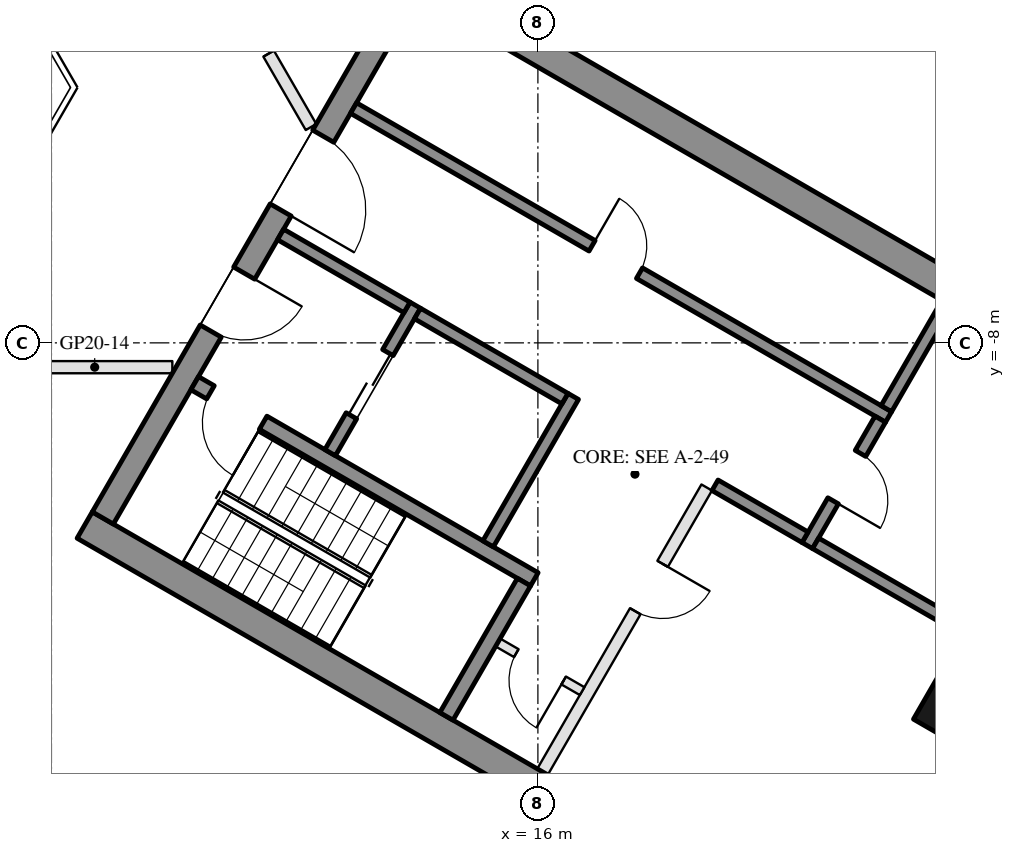
"""IFC4 building model, lengths in metres.
Left out: names, types, materials, properties, quantities, classifications, styles, units other than length and angle.
Written with IfcOpenShell. Run it as: python <this file> out.ifc"""

import sys

from ifc_helpers import new_model, si_unit, direction, frame, frame_2d, origin, origin_2d, place, context, subcontext, project, spatial, rectangle, hollow_rectangle, extrude, element, fill, save


model = new_model("IFC4")
c1 = context("Model", 3, precision=1e-05, world=origin(), true_north=direction((0.0, 1.0)))
c2 = subcontext(c1, "Body", "Model", "MODEL_VIEW")
j1 = project(units=[si_unit("LENGTHUNIT", "METRE"), si_unit("PLANEANGLEUNIT", "RADIAN")], contexts=[c1])
p1 = place(None, origin())
s1 = spatial("IfcSite", under=j1, at=p1, CompositionType="ELEMENT")
p2 = place(p1, origin())
s2 = spatial("IfcBuilding", under=s1, at=p2, CompositionType="ELEMENT")
p3 = place(p2, frame((0.0, 0.0, 213.2)))
s3 = spatial("IfcBuildingStorey", under=s2, at=p3, CompositionType="ELEMENT", Elevation=213.2)
p4 = place(p3, frame((23.729, -13.7, 0.0), z_axis=(0.0, 0.0, 1.0), x_axis=(0.5, 0.866025403784, 0.0)))
e1 = element("IfcColumn", 1, at=p4, inside=s3, PredefinedType="COLUMN", context=c2, shape_type="SweptSolid", body=[
    extrude(hollow_rectangle(XDim=2.4, YDim=2.2, WallThickness=0.06, at=origin_2d()), origin(), (0.0, 0.0, 1.0), 3.7),
])
p5 = place(p3, frame((26.257, -6.567, 0.0), z_axis=(0.0, 0.0, 1.0), x_axis=(-0.500023526245, 0.866011820475, 0.0)))
e2 = element("IfcWall", 2, at=p5, inside=s3, PredefinedType="SOLIDWALL", context=c2, shape_type="SweptSolid", body=[
    extrude(rectangle(XDim=11.816, YDim=0.35, at=frame_2d((5.908, 0.0))), origin(), (0.0, 0.0, 1.0), 3.55),
])
p6 = place(p5, frame((0.38, 0.0, 0.3)))
e3 = element("IfcOpeningElement", 3, at=p6, cuts=e2, PredefinedType="OPENING", context=c2, shape_type="SweptSolid", body=[
    extrude(rectangle(XDim=1.9, YDim=2.65, at=frame_2d((0.95, 1.325))), frame((0.0, 0.185, 0.0), z_axis=(0.0, -1.0, 0.0), x_axis=(1.0, 0.0, 0.0)), (0.0, 0.0, 1.0), 0.37),
])
p7 = place(p5, frame((7.791, 0.0, 0.0)))
e4 = element("IfcOpeningElement", 4, at=p7, cuts=e2, PredefinedType="OPENING", context=c2, shape_type="SweptSolid", body=[
    extrude(rectangle(XDim=2.4, YDim=2.4, at=frame_2d((1.2, 1.2))), frame((0.0, 0.185, 0.0), z_axis=(0.0, -1.0, 0.0), x_axis=(1.0, 0.0, 0.0)), (0.0, 0.0, 1.0), 0.37),
])
p8 = place(p5, frame((3.741, 0.0, 0.3)))
e5 = element("IfcOpeningElement", 5, at=p8, cuts=e2, PredefinedType="OPENING", context=c2, shape_type="SweptSolid", body=[
    extrude(rectangle(XDim=1.7, YDim=2.65, at=frame_2d((0.85, 1.325))), frame((0.0, 0.185, 0.0), z_axis=(0.0, -1.0, 0.0), x_axis=(1.0, 0.0, 0.0)), (0.0, 0.0, 1.0), 0.37),
])
p9 = place(p5, frame((5.741, 0.0, 0.3)))
e6 = element("IfcOpeningElement", 6, at=p9, cuts=e2, PredefinedType="OPENING", context=c2, shape_type="SweptSolid", body=[
    extrude(rectangle(XDim=1.7, YDim=2.65, at=frame_2d((0.85, 1.325))), frame((0.0, 0.185, 0.0), z_axis=(0.0, -1.0, 0.0), x_axis=(1.0, 0.0, 0.0)), (0.0, 0.0, 1.0), 0.37),
])
for number, where, z_axis, x_axis in (
    (7, (8.547, -10.997, 0.0), (0.0, 0.0, 1.0), (0.866, -0.5, 0.0)),
    (8, (13.797, -1.903, 0.0), (0.0, 0.0, 1.0), (0.866, -0.5, 0.0)),
):
    element("IfcWall", number, at=place(p3, frame(where, z_axis=z_axis, x_axis=x_axis)), inside=s3, PredefinedType="SHEAR", context=c2, shape_type="SweptSolid", body=[
        extrude(rectangle(XDim=14.837, YDim=0.5, at=frame_2d((7.418, 0.0))), origin(), (0.0, 0.0, 1.0), 3.5),
    ])
p10 = place(p3, frame((8.845, -10.88, 0.0), z_axis=(0.0, 0.0, 1.0), x_axis=(0.500004234368, 0.866022959057, 0.0)))
e9 = element("IfcWall", 9, at=p10, inside=s3, PredefinedType="SHEAR", context=c2, shape_type="SweptSolid", body=[
    extrude(rectangle(XDim=10.0, YDim=0.4, at=frame_2d((5.0, 0.0))), origin(), (0.0, 0.0, 1.0), 3.5),
])
p11 = place(p10, frame((3.55, 0.0, 0.0)))
e10 = element("IfcOpeningElement", 10, at=p11, cuts=e9, PredefinedType="OPENING", context=c2, shape_type="SweptSolid", body=[
    extrude(rectangle(XDim=1.1, YDim=2.1, at=frame_2d((0.55, 1.05))), frame((0.0, 0.21, 0.0), z_axis=(0.0, -1.0, 0.0), x_axis=(1.0, 0.0, 0.0)), (0.0, 0.0, 1.0), 0.42),
])
p12 = place(p10, frame((5.85, 0.0, 0.0)))
e11 = element("IfcOpeningElement", 11, at=p12, cuts=e9, PredefinedType="OPENING", context=c2, shape_type="SweptSolid", body=[
    extrude(rectangle(XDim=1.4, YDim=2.1, at=frame_2d((0.7, 1.05))), frame((0.0, 0.21, 0.0), z_axis=(0.0, -1.0, 0.0), x_axis=(1.0, 0.0, 0.0)), (0.0, 0.0, 1.0), 0.42),
])
p13 = place(p3, frame((10.356, -8.664, 0.0), z_axis=(0.0, 0.0, 1.0), x_axis=(0.866028629588, -0.499994412703, 0.0)))
e12 = element("IfcWall", 12, at=p13, inside=s3, PredefinedType="SHEAR", context=c2, shape_type="SweptSolid", body=[
    extrude(rectangle(XDim=6.45, YDim=0.25, at=frame_2d((3.225, 0.0))), origin(), (0.0, 0.0, 1.0), 3.5),
])
p14 = place(p13, frame((0.3, 0.0, 0.0)))
e13 = element("IfcOpeningElement", 13, at=p14, cuts=e12, PredefinedType="OPENING", context=c2, shape_type="SweptSolid", body=[
    extrude(rectangle(XDim=1.0, YDim=2.1, at=frame_2d((0.5, 1.05))), frame((0.0, 0.135, 0.0), z_axis=(0.0, -1.0, 0.0), x_axis=(1.0, 0.0, 0.0)), (0.0, 0.0, 1.0), 0.27),
])
p15 = place(p3, frame((14.496, -14.143, 0.0), z_axis=(0.0, 0.0, 1.0), x_axis=(0.500062241894, 0.865989465428, 0.0)))
e14 = element("IfcWall", 14, at=p15, inside=s3, PredefinedType="SHEAR", context=c2, shape_type="SweptSolid", body=[
    extrude(rectangle(XDim=2.55, YDim=0.25, at=frame_2d((1.275, 0.0))), origin(), (0.0, 0.0, 1.0), 3.5),
])
p16 = place(p3, frame((15.181, -11.305, 0.0), z_axis=(0.0, 0.0, 1.0), x_axis=(0.49994636267, 0.866056369097, 0.0)))
e15 = element("IfcWall", 15, at=p16, inside=s3, PredefinedType="SHEAR", context=c2, shape_type="SweptSolid", body=[
    extrude(rectangle(XDim=2.8, YDim=0.2, at=frame_2d((1.4, 0.0))), origin(), (0.0, 0.0, 1.0), 3.5),
])
p17 = place(p3, frame((12.583, -9.805, 0.0), z_axis=(0.0, 0.0, 1.0), x_axis=(0.49994636267, 0.866056369097, 0.0)))
e16 = element("IfcWall", 16, at=p17, inside=s3, PredefinedType="SHEAR", context=c2, shape_type="SweptSolid", body=[
    extrude(rectangle(XDim=2.8, YDim=0.2, at=frame_2d((1.4, 0.0))), origin(), (0.0, 0.0, 1.0), 3.5),
])
p18 = place(p17, frame((0.7, 0.0, 0.0)))
e17 = element("IfcOpeningElement", 17, at=p18, cuts=e16, PredefinedType="OPENING", context=c2, shape_type="SweptSolid", body=[
    extrude(rectangle(XDim=1.2, YDim=2.1, at=frame_2d((0.6, 1.05))), frame((0.0, 0.11, 0.0), z_axis=(0.0, -1.0, 0.0), x_axis=(1.0, 0.0, 0.0)), (0.0, 0.0, 1.0), 0.22),
])
p19 = place(p3, frame((11.768, -6.217, 0.0), z_axis=(0.0, 0.0, 1.0), x_axis=(0.866050077142, -0.499957262057, 0.0)))
e18 = element("IfcWall", 18, at=p19, inside=s3, PredefinedType="SHEAR", context=c2, shape_type="SweptSolid", body=[
    extrude(rectangle(XDim=2.4, YDim=0.2, at=frame_2d((1.2, 0.0))), origin(), (0.0, 0.0, 1.0), 3.5),
])
p20 = place(p3, frame((14.02, -7.517, 0.0), z_axis=(0.0, 0.0, 1.0), x_axis=(0.866034573852, -0.49998411664, 0.0)))
e19 = element("IfcWall", 19, at=p20, inside=s3, PredefinedType="SHEAR", context=c2, shape_type="SweptSolid", body=[
    extrude(rectangle(XDim=2.8, YDim=0.2, at=frame_2d((1.4, 0.0))), origin(), (0.0, 0.0, 1.0), 3.5),
])
p21 = place(p3, frame((12.968, -4.138, 0.0), z_axis=(0.0, 0.0, 1.0), x_axis=(0.866028328073, -0.49999493495, 0.0)))
e20 = element("IfcWall", 20, at=p21, inside=s3, PredefinedType="SHEAR", context=c2, shape_type="SweptSolid", body=[
    extrude(rectangle(XDim=10.16, YDim=0.2, at=frame_2d((5.08, 0.0))), origin(), (0.0, 0.0, 1.0), 3.5),
])
p22 = place(p21, frame((4.53, 0.0, 0.0)))
e21 = element("IfcOpeningElement", 21, at=p22, cuts=e20, PredefinedType="OPENING", context=c2, shape_type="SweptSolid", body=[
    extrude(rectangle(XDim=0.9, YDim=2.1, at=frame_2d((0.45, 1.05))), frame((0.0, 0.11, 0.0), z_axis=(0.0, -1.0, 0.0), x_axis=(1.0, 0.0, 0.0)), (0.0, 0.0, 1.0), 0.22),
])
p23 = place(p3, frame((20.43, -11.333, 0.0), z_axis=(0.0, 0.0, 1.0), x_axis=(0.500001309137, 0.866024647952, 0.0)))
e22 = element("IfcWall", 22, at=p23, inside=s3, PredefinedType="SHEAR", context=c2, shape_type="SweptSolid", body=[
    extrude(rectangle(XDim=2.4, YDim=0.2, at=frame_2d((1.2, 0.0))), origin(), (0.0, 0.0, 1.0), 3.5),
])
p24 = place(p23, frame((0.85, 0.0, 0.0)))
e23 = element("IfcOpeningElement", 23, at=p24, cuts=e22, PredefinedType="OPENING", context=c2, shape_type="SweptSolid", body=[
    extrude(rectangle(XDim=0.9, YDim=2.1, at=frame_2d((0.45, 1.05))), frame((0.0, 0.11, 0.0), z_axis=(0.0, -1.0, 0.0), x_axis=(1.0, 0.0, 0.0)), (0.0, 0.0, 1.0), 0.22),
])
p25 = place(p3, frame((18.913, -10.342, 0.0), z_axis=(0.0, 0.0, 1.0), x_axis=(0.866038183914, -0.499977863513, 0.0)))
e24 = element("IfcWall", 24, at=p25, inside=s3, PredefinedType="SHEAR", context=c2, shape_type="SweptSolid", body=[
    extrude(rectangle(XDim=1.71, YDim=0.2, at=frame_2d((0.855, 0.0))), origin(), (0.0, 0.0, 1.0), 3.5),
])
p26 = place(p3, frame((21.73, -9.082, 0.0), z_axis=(0.0, 0.0, 1.0), x_axis=(0.50002537861, 0.866010750942, 0.0)))
e25 = element("IfcWall", 25, at=p26, inside=s3, PredefinedType="SHEAR", context=c2, shape_type="SweptSolid", body=[
    extrude(rectangle(XDim=2.0, YDim=0.2, at=frame_2d((1.0, 0.0))), origin(), (0.0, 0.0, 1.0), 3.5),
])
p27 = place(p3, frame((20.567, -11.297, 0.0), z_axis=(0.0, 0.0, 1.0), x_axis=(0.866055327414, -0.49994816717, 0.0)))
e26 = element("IfcWall", 26, at=p27, inside=s3, PredefinedType="SHEAR", context=c2, shape_type="SweptSolid", body=[
    extrude(rectangle(XDim=2.84, YDim=0.2, at=frame_2d((1.42, 0.0))), origin(), (0.0, 0.0, 1.0), 3.5),
])
p28 = place(p3, frame((16.076, -15.055, 0.0), z_axis=(0.0, 0.0, 1.0), x_axis=(0.499995103361, 0.866028230842, 0.0)))
e27 = element("IfcWall", 27, at=p28, inside=s3, PredefinedType="PARTITIONING", context=c2, shape_type="SweptSolid", body=[
    extrude(rectangle(XDim=5.4, YDim=0.2, at=frame_2d((2.7, 0.0))), origin(), (0.0, 0.0, 1.0), 3.5),
])
p29 = place(p28, frame((3.05, 0.0, 0.0)))
e28 = element("IfcOpeningElement", 28, at=p29, cuts=e27, PredefinedType="OPENING", context=c2, shape_type="SweptSolid", body=[
    extrude(rectangle(XDim=0.9, YDim=2.1, at=frame_2d((0.45, 1.05))), frame((0.0, 0.11, 0.0), z_axis=(0.0, -1.0, 0.0), x_axis=(1.0, 0.0, 0.0)), (0.0, 0.0, 1.0), 0.22),
])
p30 = place(p3, frame((15.342, -12.928, 0.0), z_axis=(0.0, 0.0, 1.0), x_axis=(0.865989903783, -0.500061482766, 0.0)))
e29 = element("IfcWall", 29, at=p30, inside=s3, PredefinedType="PARTITIONING", context=c2, shape_type="SweptSolid", body=[
    extrude(rectangle(XDim=1.6, YDim=0.15, at=frame_2d((0.8, 0.0))), origin(), (0.0, 0.0, 1.0), 3.5),
])
p31 = place(p30, frame((0.35, 0.0, 0.0)))
e30 = element("IfcOpeningElement", 30, at=p31, cuts=e29, PredefinedType="OPENING", context=c2, shape_type="SweptSolid", body=[
    extrude(rectangle(XDim=0.9, YDim=2.1, at=frame_2d((0.45, 1.05))), frame((0.0, 0.085, 0.0), z_axis=(0.0, -1.0, 0.0), x_axis=(1.0, 0.0, 0.0)), (0.0, 0.0, 1.0), 0.17),
])
p32 = place(p3, frame((9.988, -8.4, 0.0), z_axis=(0.0, 0.0, 1.0), x_axis=(-1.0, 0.0, 0.0)))
e31 = element("IfcWall", 31, at=p32, inside=s3, PredefinedType="PARTITIONING", context=c2, shape_type="SweptSolid", body=[
    extrude(rectangle(XDim=6.385, YDim=0.2, at=frame_2d((3.192, 0.0))), origin(), (0.0, 0.0, 1.0), 2.95),
])
p33 = place(p32, frame((2.692, 0.0, 0.0)))
e32 = element("IfcOpeningElement", 32, at=p33, cuts=e31, PredefinedType="OPENING", context=c2, shape_type="SweptSolid", body=[
    extrude(rectangle(XDim=1.0, YDim=2.1, at=frame_2d((0.5, 1.05))), frame((0.0, 0.11, 0.0), z_axis=(0.0, -1.0, 0.0), x_axis=(1.0, 0.0, 0.0)), (0.0, 0.0, 1.0), 0.22),
])
p34 = place(p3, frame((10.375, -1.169, 0.0), z_axis=(0.0, 0.0, 1.0), x_axis=(0.500055316652, -0.865993464345, 0.0)))
e33 = element("IfcWall", 33, at=p34, inside=s3, PredefinedType="PARTITIONING", context=c2, shape_type="SweptSolid", body=[
    extrude(rectangle(XDim=3.788, YDim=0.2, at=frame_2d((1.894, 0.0))), origin(), (0.0, 0.0, 1.0), 2.95),
])
p35 = place(p34, frame((1.394, 0.0, 0.0)))
e34 = element("IfcOpeningElement", 34, at=p35, cuts=e33, PredefinedType="OPENING", context=c2, shape_type="SweptSolid", body=[
    extrude(rectangle(XDim=1.0, YDim=2.1, at=frame_2d((0.5, 1.05))), frame((0.0, 0.11, 0.0), z_axis=(0.0, -1.0, 0.0), x_axis=(1.0, 0.0, 0.0)), (0.0, 0.0, 1.0), 0.22),
])
p36 = place(p18, origin())
e35 = element("IfcDoor", 35, at=p36, inside=s3, OperationType="DOUBLE_DOOR_SLIDING", PredefinedType="DOOR", context=c2, shape_type="SweptSolid", body=[
    extrude(rectangle(XDim=1.2, YDim=2.1, at=frame_2d((0.6, 1.05))), frame((0.0, 0.025, 0.0), z_axis=(0.0, -1.0, 0.0), x_axis=(1.0, 0.0, 0.0)), (0.0, 0.0, 1.0), 0.05),
])
fill(e17, e35)
p37 = place(p31, frame((0.9, 0.0, 0.0), z_axis=(0.0, 0.0, 1.0), x_axis=(-1.0, 0.0, 0.0)))
e36 = element("IfcDoor", 36, at=p37, inside=s3, OperationType="SINGLE_SWING_LEFT", PredefinedType="DOOR", context=c2, shape_type="SweptSolid", body=[
    extrude(rectangle(XDim=0.9, YDim=2.1, at=frame_2d((0.45, 1.05))), frame((0.0, 0.025, 0.0), z_axis=(0.0, -1.0, 0.0), x_axis=(1.0, 0.0, 0.0)), (0.0, 0.0, 1.0), 0.05),
])
fill(e30, e36)
p38 = place(p22, origin())
e37 = element("IfcDoor", 37, at=p38, inside=s3, OperationType="SINGLE_SWING_LEFT", PredefinedType="DOOR", context=c2, shape_type="SweptSolid", body=[
    extrude(rectangle(XDim=0.9, YDim=2.1, at=frame_2d((0.45, 1.05))), frame((0.0, 0.025, 0.0), z_axis=(0.0, -1.0, 0.0), x_axis=(1.0, 0.0, 0.0)), (0.0, 0.0, 1.0), 0.05),
])
fill(e21, e37)
p39 = place(p24, frame((0.9, 0.0, 0.0), z_axis=(0.0, 0.0, 1.0), x_axis=(-1.0, 0.0, 0.0)))
e38 = element("IfcDoor", 38, at=p39, inside=s3, OperationType="SINGLE_SWING_RIGHT", PredefinedType="DOOR", context=c2, shape_type="SweptSolid", body=[
    extrude(rectangle(XDim=0.9, YDim=2.1, at=frame_2d((0.45, 1.05))), frame((0.0, 0.025, 0.0), z_axis=(0.0, -1.0, 0.0), x_axis=(1.0, 0.0, 0.0)), (0.0, 0.0, 1.0), 0.05),
])
fill(e23, e38)
p40 = place(p29, frame((0.9, 0.0, 0.0), z_axis=(0.0, 0.0, 1.0), x_axis=(-1.0, 0.0, 0.0)))
e39 = element("IfcDoor", 39, at=p40, inside=s3, OperationType="SINGLE_SWING_LEFT", PredefinedType="DOOR", context=c2, shape_type="SweptSolid", body=[
    extrude(rectangle(XDim=0.9, YDim=2.1, at=frame_2d((0.45, 1.05))), frame((0.0, 0.025, 0.0), z_axis=(0.0, -1.0, 0.0), x_axis=(1.0, 0.0, 0.0)), (0.0, 0.0, 1.0), 0.05),
])
fill(e28, e39)
p41 = place(p11, frame((1.1, 0.0, 0.0), z_axis=(0.0, 0.0, 1.0), x_axis=(-1.0, 0.0, 0.0)))
e40 = element("IfcDoor", 40, at=p41, inside=s3, OperationType="SINGLE_SWING_LEFT", PredefinedType="DOOR", context=c2, shape_type="SweptSolid", body=[
    extrude(rectangle(XDim=1.1, YDim=2.1, at=frame_2d((0.55, 1.05))), frame((0.0, 0.025, 0.0), z_axis=(0.0, -1.0, 0.0), x_axis=(1.0, 0.0, 0.0)), (0.0, 0.0, 1.0), 0.05),
])
fill(e10, e40)
p42 = place(p12, frame((1.4, 0.0, 0.0), z_axis=(0.0, 0.0, 1.0), x_axis=(-1.0, 0.0, 0.0)))
e41 = element("IfcDoor", 41, at=p42, inside=s3, OperationType="DOUBLE_DOOR_SINGLE_SWING", PredefinedType="DOOR", context=c2, shape_type="SweptSolid", body=[
    extrude(rectangle(XDim=1.4, YDim=2.1, at=frame_2d((0.7, 1.05))), frame((0.0, 0.025, 0.0), z_axis=(0.0, -1.0, 0.0), x_axis=(1.0, 0.0, 0.0)), (0.0, 0.0, 1.0), 0.05),
])
fill(e11, e41)
p43 = place(p14, frame((1.0, 0.0, 0.0), z_axis=(0.0, 0.0, 1.0), x_axis=(-1.0, 0.0, 0.0)))
e42 = element("IfcDoor", 42, at=p43, inside=s3, OperationType="SINGLE_SWING_LEFT", PredefinedType="DOOR", context=c2, shape_type="SweptSolid", body=[
    extrude(rectangle(XDim=1.0, YDim=2.1, at=frame_2d((0.5, 1.05))), frame((0.0, 0.025, 0.0), z_axis=(0.0, -1.0, 0.0), x_axis=(1.0, 0.0, 0.0)), (0.0, 0.0, 1.0), 0.05),
])
fill(e13, e42)
p44 = place(p35, origin())
e43 = element("IfcDoor", 43, at=p44, inside=s3, OperationType="SINGLE_SWING_LEFT", PredefinedType="DOOR", context=c2, shape_type="SweptSolid", body=[
    extrude(rectangle(XDim=1.0, YDim=2.1, at=frame_2d((0.5, 1.05))), frame((0.0, 0.025, 0.0), z_axis=(0.0, -1.0, 0.0), x_axis=(1.0, 0.0, 0.0)), (0.0, 0.0, 1.0), 0.05),
])
fill(e34, e43)
save(model, sys.argv[1])
